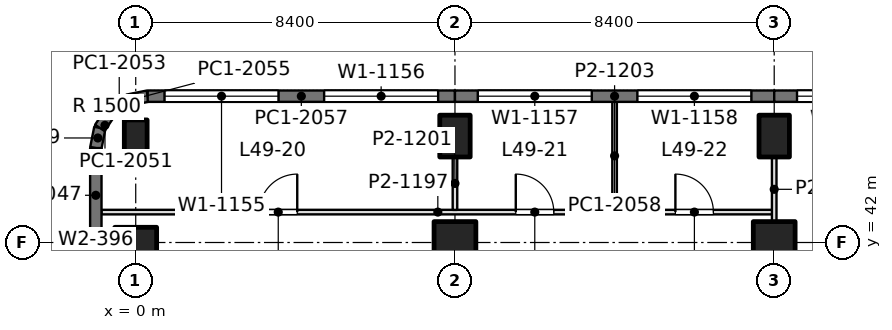
"""IFC4 building model, lengths in metres.
Left out: names, types, materials, properties, quantities, classifications, styles, units other than length and angle.
Written with IfcOpenShell. Run it as: python <this file> out.ifc"""

import sys

from ifc_helpers import new_model, si_unit, direction, frame, frame_2d, origin, origin_2d, place, context, subcontext, project, spatial, rectangle, extrude, element, fill, save


model = new_model("IFC4")
c1 = context("Model", 3, precision=1e-05, world=origin(), true_north=direction((0.0, 1.0)))
c2 = subcontext(c1, "Body", "Model", "MODEL_VIEW")
j1 = project(units=[si_unit("LENGTHUNIT", "METRE"), si_unit("PLANEANGLEUNIT", "RADIAN")], contexts=[c1])
p1 = place(None, origin())
s1 = spatial("IfcSite", under=j1, at=p1, CompositionType="ELEMENT")
p2 = place(p1, origin())
s2 = spatial("IfcBuilding", under=s1, at=p2, CompositionType="ELEMENT")
p3 = place(p2, frame((0.0, 0.0, 215.4)))
s3 = spatial("IfcBuildingStorey", under=s2, at=p3, CompositionType="ELEMENT", Elevation=215.4)
p4 = place(p3, frame((0.0, 42.0, 0.0), z_axis=(0.0, 0.0, 1.0), x_axis=(0.0, 1.0, 0.0)))
e1 = element("IfcColumn", 1, at=p4, inside=s3, PredefinedType="COLUMN", context=c2, shape_type="SweptSolid", body=[
    extrude(rectangle(XDim=0.8, YDim=1.1, at=origin_2d()), origin(), (0.0, 0.0, 1.0), 4.2),
])
p5 = place(p3, frame((0.0, 44.8, 0.0), z_axis=(0.0, 0.0, 1.0), x_axis=(1.0, 0.0, 0.0)))
e2 = element("IfcColumn", 2, at=p5, inside=s3, PredefinedType="COLUMN", context=c2, shape_type="SweptSolid", body=[
    extrude(rectangle(XDim=0.6, YDim=0.85, at=origin_2d()), origin(), (0.0, 0.0, 1.0), 4.2),
])
p6 = place(p3, frame((8.4, 42.0, 0.0), z_axis=(0.0, 0.0, 1.0), x_axis=(1.0, 0.0, 0.0)))
e3 = element("IfcColumn", 3, at=p6, inside=s3, PredefinedType="COLUMN", context=c2, shape_type="SweptSolid", body=[
    extrude(rectangle(XDim=1.1, YDim=1.1, at=origin_2d()), origin(), (0.0, 0.0, 1.0), 4.2),
])
p7 = place(p3, frame((8.4, 44.8, 0.0), z_axis=(0.0, 0.0, 1.0), x_axis=(1.0, 0.0, 0.0)))
e4 = element("IfcColumn", 4, at=p7, inside=s3, PredefinedType="COLUMN", context=c2, shape_type="SweptSolid", body=[
    extrude(rectangle(XDim=0.8, YDim=1.1, at=origin_2d()), origin(), (0.0, 0.0, 1.0), 4.2),
])
p8 = place(p3, frame((16.8, 42.0, 0.0), z_axis=(0.0, 0.0, 1.0), x_axis=(1.0, 0.0, 0.0)))
e5 = element("IfcColumn", 5, at=p8, inside=s3, PredefinedType="COLUMN", context=c2, shape_type="SweptSolid", body=[
    extrude(rectangle(XDim=1.1, YDim=1.1, at=origin_2d()), origin(), (0.0, 0.0, 1.0), 4.2),
])
p9 = place(p3, frame((16.8, 44.8, 0.0), z_axis=(0.0, 0.0, 1.0), x_axis=(1.0, 0.0, 0.0)))
e6 = element("IfcColumn", 6, at=p9, inside=s3, PredefinedType="COLUMN", context=c2, shape_type="SweptSolid", body=[
    extrude(rectangle(XDim=0.8, YDim=1.1, at=origin_2d()), origin(), (0.0, 0.0, 1.0), 4.2),
])
p10 = place(p3, frame((-1.05, 37.725, 0.0), z_axis=(0.0, 0.0, 1.0), x_axis=(0.0, 1.0, 0.0)))
e7 = element("IfcWall", 7, at=p10, inside=s3, PredefinedType="SOLIDWALL", context=c2, shape_type="SweptSolid", body=[
    extrude(rectangle(XDim=4.275, YDim=0.3, at=frame_2d((2.137, 0.0))), origin(), (0.0, 0.0, 1.0), 4.05),
])
p11 = place(p10, frame((0.938, 0.0, 0.9)))
e8 = element("IfcOpeningElement", 8, at=p11, cuts=e7, PredefinedType="OPENING", context=c2, shape_type="SweptSolid", body=[
    extrude(rectangle(XDim=2.4, YDim=1.9, at=frame_2d((1.2, 0.95))), frame((0.0, 0.16, 0.0), z_axis=(0.0, -1.0, 0.0), x_axis=(1.0, 0.0, 0.0)), (0.0, 0.0, 1.0), 0.32),
])
p12 = place(p3, frame((-1.05, 42.0, 0.0), z_axis=(0.0, 0.0, 1.0), x_axis=(0.0, 1.0, 0.0)))
e9 = element("IfcWall", 9, at=p12, inside=s3, PredefinedType="SOLIDWALL", context=c2, shape_type="SweptSolid", body=[
    extrude(rectangle(XDim=2.485, YDim=0.3, at=frame_2d((1.243, 0.0))), origin(), (0.0, 0.0, 1.0), 4.05),
])
p13 = place(p3, frame((-1.05, 44.485, 0.0), z_axis=(0.0, 0.0, 1.0), x_axis=(0.195073962632, 0.980788534345, 0.0)))
e10 = element("IfcWall", 10, at=p13, inside=s3, PredefinedType="SOLIDWALL", context=c2, shape_type="SweptSolid", body=[
    extrude(rectangle(XDim=0.541, YDim=0.3, at=frame_2d((0.271, 0.0))), origin(), (0.0, 0.0, 1.0), 4.05),
])
p14 = place(p3, frame((-0.945, 45.015, 0.0), z_axis=(0.0, 0.0, 1.0), x_axis=(0.55534295404, 0.831621430339, 0.0)))
e11 = element("IfcWall", 11, at=p14, inside=s3, PredefinedType="SOLIDWALL", context=c2, shape_type="SweptSolid", body=[
    extrude(rectangle(XDim=0.526, YDim=0.3, at=frame_2d((0.263, 0.0))), origin(), (0.0, 0.0, 1.0), 4.05),
])
p15 = place(p3, frame((-0.653, 45.453, 0.0), z_axis=(0.0, 0.0, 1.0), x_axis=(0.831692711774, 0.555236195849, 0.0)))
e12 = element("IfcWall", 12, at=p15, inside=s3, PredefinedType="SOLIDWALL", context=c2, shape_type="SweptSolid", body=[
    extrude(rectangle(XDim=0.525, YDim=0.3, at=frame_2d((0.263, 0.0))), origin(), (0.0, 0.0, 1.0), 4.05),
])
p16 = place(p3, frame((-0.216, 45.744, 0.0), z_axis=(0.0, 0.0, 1.0), x_axis=(0.980702050465, 0.1955082817, 0.0)))
e13 = element("IfcWall", 13, at=p16, inside=s3, PredefinedType="SOLIDWALL", context=c2, shape_type="SweptSolid", body=[
    extrude(rectangle(XDim=0.541, YDim=0.3, at=frame_2d((0.271, 0.0))), origin(), (0.0, 0.0, 1.0), 4.05),
])
p17 = place(p3, frame((0.315, 45.85, 0.0), z_axis=(0.0, 0.0, 1.0), x_axis=(1.0, 0.0, 0.0)))
e14 = element("IfcWall", 14, at=p17, inside=s3, PredefinedType="SOLIDWALL", context=c2, shape_type="SweptSolid", body=[
    extrude(rectangle(XDim=8.085, YDim=0.3, at=frame_2d((4.042, 0.0))), origin(), (0.0, 0.0, 1.0), 4.05),
])
p18 = place(p17, frame((0.443, 0.0, 0.9)))
e15 = element("IfcOpeningElement", 15, at=p18, cuts=e14, PredefinedType="OPENING", context=c2, shape_type="SweptSolid", body=[
    extrude(rectangle(XDim=3.0, YDim=1.9, at=frame_2d((1.5, 0.95))), frame((0.0, 0.16, 0.0), z_axis=(0.0, -1.0, 0.0), x_axis=(1.0, 0.0, 0.0)), (0.0, 0.0, 1.0), 0.32),
])
p19 = place(p17, frame((4.643, 0.0, 0.9)))
e16 = element("IfcOpeningElement", 16, at=p19, cuts=e14, PredefinedType="OPENING", context=c2, shape_type="SweptSolid", body=[
    extrude(rectangle(XDim=3.0, YDim=1.9, at=frame_2d((1.5, 0.95))), frame((0.0, 0.16, 0.0), z_axis=(0.0, -1.0, 0.0), x_axis=(1.0, 0.0, 0.0)), (0.0, 0.0, 1.0), 0.32),
])
p20 = place(p3, frame((8.4, 45.85, 0.0), z_axis=(0.0, 0.0, 1.0), x_axis=(1.0, 0.0, 0.0)))
e17 = element("IfcWall", 17, at=p20, inside=s3, PredefinedType="SOLIDWALL", context=c2, shape_type="SweptSolid", body=[
    extrude(rectangle(XDim=8.4, YDim=0.3, at=frame_2d((4.2, 0.0))), origin(), (0.0, 0.0, 1.0), 4.05),
])
p21 = place(p20, frame((0.6, 0.0, 0.9)))
e18 = element("IfcOpeningElement", 18, at=p21, cuts=e17, PredefinedType="OPENING", context=c2, shape_type="SweptSolid", body=[
    extrude(rectangle(XDim=3.0, YDim=1.9, at=frame_2d((1.5, 0.95))), frame((0.0, 0.16, 0.0), z_axis=(0.0, -1.0, 0.0), x_axis=(1.0, 0.0, 0.0)), (0.0, 0.0, 1.0), 0.32),
])
p22 = place(p20, frame((4.8, 0.0, 0.9)))
e19 = element("IfcOpeningElement", 19, at=p22, cuts=e17, PredefinedType="OPENING", context=c2, shape_type="SweptSolid", body=[
    extrude(rectangle(XDim=3.0, YDim=1.9, at=frame_2d((1.5, 0.95))), frame((0.0, 0.16, 0.0), z_axis=(0.0, -1.0, 0.0), x_axis=(1.0, 0.0, 0.0)), (0.0, 0.0, 1.0), 0.32),
])
p23 = place(p3, frame((16.8, 45.85, 0.0), z_axis=(0.0, 0.0, 1.0), x_axis=(1.0, 0.0, 0.0)))
e20 = element("IfcWall", 20, at=p23, inside=s3, PredefinedType="SOLIDWALL", context=c2, shape_type="SweptSolid", body=[
    extrude(rectangle(XDim=8.4, YDim=0.3, at=frame_2d((4.2, 0.0))), origin(), (0.0, 0.0, 1.0), 4.05),
])
p24 = place(p23, frame((0.6, 0.0, 0.9)))
e21 = element("IfcOpeningElement", 21, at=p24, cuts=e20, PredefinedType="OPENING", context=c2, shape_type="SweptSolid", body=[
    extrude(rectangle(XDim=3.0, YDim=1.9, at=frame_2d((1.5, 0.95))), frame((0.0, 0.16, 0.0), z_axis=(0.0, -1.0, 0.0), x_axis=(1.0, 0.0, 0.0)), (0.0, 0.0, 1.0), 0.32),
])
p25 = place(p23, frame((4.8, 0.0, 0.9)))
e22 = element("IfcOpeningElement", 22, at=p25, cuts=e20, PredefinedType="OPENING", context=c2, shape_type="SweptSolid", body=[
    extrude(rectangle(XDim=3.0, YDim=1.9, at=frame_2d((1.5, 0.95))), frame((0.0, 0.16, 0.0), z_axis=(0.0, -1.0, 0.0), x_axis=(1.0, 0.0, 0.0)), (0.0, 0.0, 1.0), 0.32),
])
p26 = place(p3, frame((-0.902, 42.8, 0.0), z_axis=(0.0, 0.0, 1.0), x_axis=(1.0, 0.0, 0.0)))
e23 = element("IfcWall", 23, at=p26, inside=s3, PredefinedType="PARTITIONING", context=c2, shape_type="SweptSolid", body=[
    extrude(rectangle(XDim=17.702, YDim=0.12, at=frame_2d((8.851, 0.0))), origin(), (0.0, 0.0, 1.0), 3.56),
])
p27 = place(p26, frame((4.152, 0.0, 0.0)))
e24 = element("IfcOpeningElement", 24, at=p27, cuts=e23, PredefinedType="OPENING", context=c2, shape_type="SweptSolid", body=[
    extrude(rectangle(XDim=1.0, YDim=2.4, at=frame_2d((0.5, 1.2))), frame((0.0, 0.07, 0.0), z_axis=(0.0, -1.0, 0.0), x_axis=(1.0, 0.0, 0.0)), (0.0, 0.0, 1.0), 0.14),
])
p28 = place(p26, frame((10.902, 0.0, 0.0)))
e25 = element("IfcOpeningElement", 25, at=p28, cuts=e23, PredefinedType="OPENING", context=c2, shape_type="SweptSolid", body=[
    extrude(rectangle(XDim=1.0, YDim=2.4, at=frame_2d((0.5, 1.2))), frame((0.0, 0.07, 0.0), z_axis=(0.0, -1.0, 0.0), x_axis=(1.0, 0.0, 0.0)), (0.0, 0.0, 1.0), 0.14),
])
p29 = place(p26, frame((15.102, 0.0, 0.0)))
e26 = element("IfcOpeningElement", 26, at=p29, cuts=e23, PredefinedType="OPENING", context=c2, shape_type="SweptSolid", body=[
    extrude(rectangle(XDim=1.0, YDim=2.4, at=frame_2d((0.5, 1.2))), frame((0.0, 0.07, 0.0), z_axis=(0.0, -1.0, 0.0), x_axis=(1.0, 0.0, 0.0)), (0.0, 0.0, 1.0), 0.14),
])
p30 = place(p3, frame((8.4, 42.858, 0.0), z_axis=(0.0, 0.0, 1.0), x_axis=(0.0, 1.0, 0.0)))
e27 = element("IfcWall", 27, at=p30, inside=s3, PredefinedType="PARTITIONING", context=c2, shape_type="SweptSolid", body=[
    extrude(rectangle(XDim=1.393, YDim=0.12, at=frame_2d((0.697, 0.0))), origin(), (0.0, 0.0, 1.0), 3.69),
])
p31 = place(p3, frame((12.6, 42.858, 0.0), z_axis=(0.0, 0.0, 1.0), x_axis=(0.0, 1.0, 0.0)))
e28 = element("IfcWall", 28, at=p31, inside=s3, PredefinedType="PARTITIONING", context=c2, shape_type="SweptSolid", body=[
    extrude(rectangle(XDim=2.844, YDim=0.12, at=frame_2d((1.422, 0.0))), origin(), (0.0, 0.0, 1.0), 3.56),
])
p32 = place(p3, frame((16.8, 42.548, 0.0), z_axis=(0.0, 0.0, 1.0), x_axis=(0.0, 1.0, 0.0)))
e29 = element("IfcWall", 29, at=p32, inside=s3, PredefinedType="PARTITIONING", context=c2, shape_type="SweptSolid", body=[
    extrude(rectangle(XDim=1.703, YDim=0.12, at=frame_2d((0.852, 0.0))), origin(), (0.0, 0.0, 1.0), 3.69),
])
p33 = place(p18, origin())
e30 = element("IfcWindow", 30, at=p33, inside=s3, PartitioningType="SINGLE_PANEL", PredefinedType="WINDOW", context=c2, shape_type="SweptSolid", body=[
    extrude(rectangle(XDim=3.0, YDim=1.9, at=frame_2d((1.5, 0.95))), frame((0.0, 0.03, 0.0), z_axis=(0.0, -1.0, 0.0), x_axis=(1.0, 0.0, 0.0)), (0.0, 0.0, 1.0), 0.06),
])
fill(e15, e30)
p34 = place(p19, origin())
e31 = element("IfcWindow", 31, at=p34, inside=s3, PartitioningType="SINGLE_PANEL", PredefinedType="WINDOW", context=c2, shape_type="SweptSolid", body=[
    extrude(rectangle(XDim=3.0, YDim=1.9, at=frame_2d((1.5, 0.95))), frame((0.0, 0.03, 0.0), z_axis=(0.0, -1.0, 0.0), x_axis=(1.0, 0.0, 0.0)), (0.0, 0.0, 1.0), 0.06),
])
fill(e16, e31)
p35 = place(p21, origin())
e32 = element("IfcWindow", 32, at=p35, inside=s3, PartitioningType="SINGLE_PANEL", PredefinedType="WINDOW", context=c2, shape_type="SweptSolid", body=[
    extrude(rectangle(XDim=3.0, YDim=1.9, at=frame_2d((1.5, 0.95))), frame((0.0, 0.03, 0.0), z_axis=(0.0, -1.0, 0.0), x_axis=(1.0, 0.0, 0.0)), (0.0, 0.0, 1.0), 0.06),
])
fill(e18, e32)
p36 = place(p22, origin())
e33 = element("IfcWindow", 33, at=p36, inside=s3, PartitioningType="SINGLE_PANEL", PredefinedType="WINDOW", context=c2, shape_type="SweptSolid", body=[
    extrude(rectangle(XDim=3.0, YDim=1.9, at=frame_2d((1.5, 0.95))), frame((0.0, 0.03, 0.0), z_axis=(0.0, -1.0, 0.0), x_axis=(1.0, 0.0, 0.0)), (0.0, 0.0, 1.0), 0.06),
])
fill(e19, e33)
p37 = place(p24, origin())
e34 = element("IfcWindow", 34, at=p37, inside=s3, PartitioningType="SINGLE_PANEL", PredefinedType="WINDOW", context=c2, shape_type="SweptSolid", body=[
    extrude(rectangle(XDim=3.0, YDim=1.9, at=frame_2d((1.5, 0.95))), frame((0.0, 0.03, 0.0), z_axis=(0.0, -1.0, 0.0), x_axis=(1.0, 0.0, 0.0)), (0.0, 0.0, 1.0), 0.06),
])
fill(e21, e34)
p38 = place(p27, origin())
e35 = element("IfcDoor", 35, at=p38, inside=s3, OperationType="SINGLE_SWING_RIGHT", PredefinedType="DOOR", context=c2, shape_type="SweptSolid", body=[
    extrude(rectangle(XDim=1.0, YDim=2.4, at=frame_2d((0.5, 1.2))), frame((0.0, 0.025, 0.0), z_axis=(0.0, -1.0, 0.0), x_axis=(1.0, 0.0, 0.0)), (0.0, 0.0, 1.0), 0.05),
])
fill(e24, e35)
p39 = place(p28, origin())
e36 = element("IfcDoor", 36, at=p39, inside=s3, OperationType="SINGLE_SWING_LEFT", PredefinedType="DOOR", context=c2, shape_type="SweptSolid", body=[
    extrude(rectangle(XDim=1.0, YDim=2.4, at=frame_2d((0.5, 1.2))), frame((0.0, 0.025, 0.0), z_axis=(0.0, -1.0, 0.0), x_axis=(1.0, 0.0, 0.0)), (0.0, 0.0, 1.0), 0.05),
])
fill(e25, e36)
p40 = place(p29, origin())
e37 = element("IfcDoor", 37, at=p40, inside=s3, OperationType="SINGLE_SWING_LEFT", PredefinedType="DOOR", context=c2, shape_type="SweptSolid", body=[
    extrude(rectangle(XDim=1.0, YDim=2.4, at=frame_2d((0.5, 1.2))), frame((0.0, 0.025, 0.0), z_axis=(0.0, -1.0, 0.0), x_axis=(1.0, 0.0, 0.0)), (0.0, 0.0, 1.0), 0.05),
])
fill(e26, e37)
save(model, sys.argv[1])
